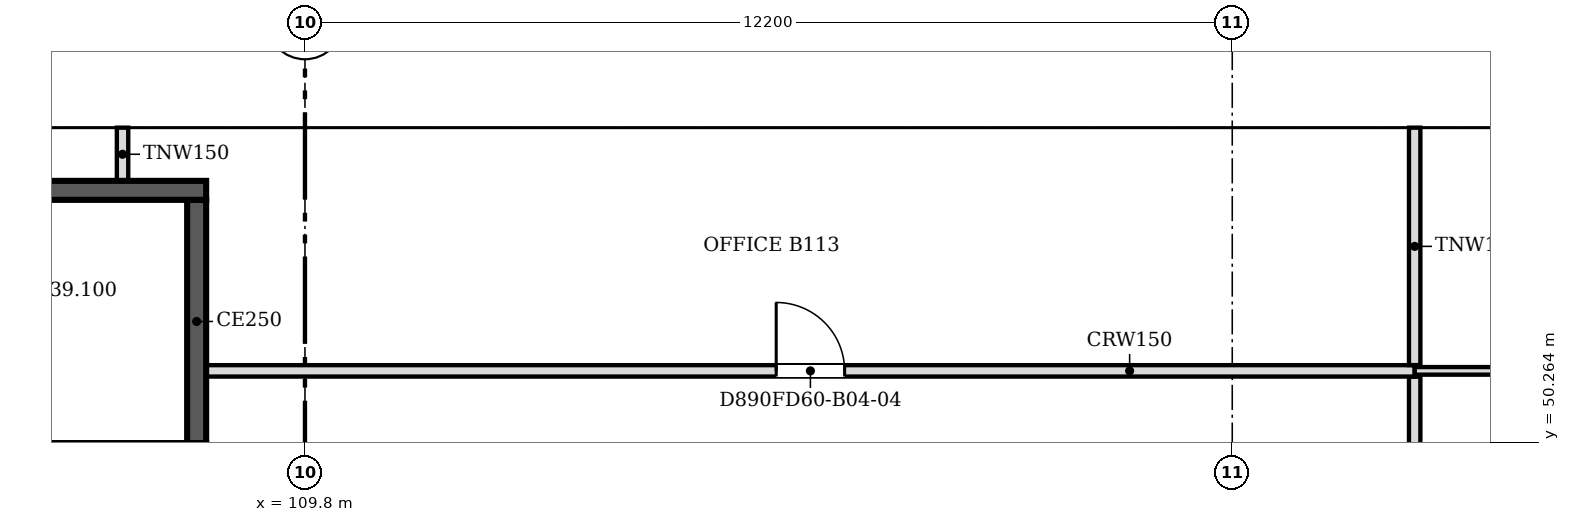
"""IFC4 building model, lengths in metres.
Left out: names, types, materials, properties, quantities, classifications, styles, units other than length and angle.
Written with IfcOpenShell. Run it as: python <this file> out.ifc"""

import sys

from ifc_helpers import new_model, si_unit, direction, frame, frame_2d, origin, place, context, subcontext, project, spatial, polyline, rectangle, outline, extrude, faceted_brep, source, transform, mapped, element, fill, save


model = new_model("IFC4")
c1 = context("Model", 3, precision=1e-05, world=origin(), true_north=direction((0.0, 1.0)))
c2 = subcontext(c1, "Body", "Model", "MODEL_VIEW")
j1 = project(units=[si_unit("LENGTHUNIT", "METRE"), si_unit("PLANEANGLEUNIT", "RADIAN")], contexts=[c1])
p1 = place(None, origin())
s1 = spatial("IfcSite", under=j1, at=p1, CompositionType="ELEMENT")
p2 = place(p1, origin())
s2 = spatial("IfcBuilding", under=s1, at=p2, CompositionType="ELEMENT")
p3 = place(p2, frame((0.0, 0.0, 37.2)))
s3 = spatial("IfcBuildingStorey", under=s2, at=p3, CompositionType="ELEMENT", Elevation=37.2)
m1 = source(origin(), c2, "Body", "Brep", [
    faceted_brep([(3.003, -0.25, 0.0), (6.053, -0.25, 3.8), (3.003, -0.25, 7.6), (0.0, -0.25, 3.8), (0.047, 0.25, 3.859), (3.003, 0.25, 7.6), (6.053, 0.25, 3.8), (3.003, 0.25, 0.0), (0.047, 0.25, 3.741), (0.0, 0.0, 3.8)], [[[0, 1, 2, 3]], [[4, 5, 6, 7, 8]], [[7, 6, 1, 0]], [[6, 5, 2, 1]], [[5, 4, 9, 3, 2]], [[8, 7, 0, 3, 9]], [[8, 9, 4]]]),
])
p4 = place(p3, frame((128.053, 54.65, -3.8), z_axis=(0.0, 0.0, 1.0), x_axis=(-1.0, 0.0, 0.0)))
e1 = element("IfcWall", 1, at=p4, inside=s3, PredefinedType="SOLIDWALL", context=c2, shape_type="MappedRepresentation", body=[
    mapped(m1, transform((0.0, 0.0, 0.0), scale=1.0)),
])
m2 = source(origin(), c2, "Body", "SweptSolid", [
    extrude(outline(polyline([(3.005, 0.401), (5.733, 3.8), (3.005, 7.199), (0.319, 3.8), (3.005, 0.401)])), frame((0.0, 0.26, 0.0), z_axis=(0.0, -1.0, 0.0), x_axis=(1.0, 0.0, 0.0)), (0.0, 0.0, 1.0), 0.52),
])
p5 = place(p4, origin())
e2 = element("IfcOpeningElement", 2, at=p5, cuts=e1, PredefinedType="OPENING", context=c2, shape_type="MappedRepresentation", body=[
    mapped(m2, transform((0.0, 0.0, 0.0), scale=1.0)),
])
m3 = source(origin(), c2, "Body", "SweptSolid", [
    extrude(outline(polyline([(3.05, 0.0), (6.1, 3.8), (3.05, 7.6), (0.0, 3.8), (3.05, 0.0)])), frame((0.0, 0.25, 0.0), z_axis=(0.0, -1.0, 0.0), x_axis=(1.0, 0.0, 0.0)), (0.0, 0.0, 1.0), 0.5),
])
p6 = place(p3, frame((122.0, 54.65, -3.8), z_axis=(0.0, 0.0, 1.0), x_axis=(-1.0, 0.0, 0.0)))
e3 = element("IfcWall", 3, at=p6, inside=s3, PredefinedType="SOLIDWALL", context=c2, shape_type="MappedRepresentation", body=[
    mapped(m3, transform((0.0, 0.0, 0.0), scale=1.0)),
])
m4 = source(origin(), c2, "Body", "SweptSolid", [
    extrude(outline(polyline([(3.05, 0.399), (5.78, 3.8), (3.05, 7.201), (0.321, 3.8), (3.05, 0.399)])), frame((0.0, 0.26, 0.0), z_axis=(0.0, -1.0, 0.0), x_axis=(1.0, 0.0, 0.0)), (0.0, 0.0, 1.0), 0.52),
])
p7 = place(p6, origin())
e4 = element("IfcOpeningElement", 4, at=p7, cuts=e3, PredefinedType="OPENING", context=c2, shape_type="MappedRepresentation", body=[
    mapped(m4, transform((0.0, 0.0, 0.0), scale=1.0)),
])
m5 = source(origin(), c2, "Body", "Brep", [
    faceted_brep([(3.05, -0.25, 0.0), (6.1, -0.25, 3.8), (6.1, -0.25, 3.8), (3.05, -0.25, 7.6), (0.0, -0.25, 3.8), (0.0, 0.25, 3.8), (3.05, 0.25, 7.6), (6.1, 0.25, 3.8), (6.1, 0.25, 3.8), (3.05, 0.25, 0.0)], [[[0, 1, 2, 3, 4]], [[5, 6, 7, 8, 9]], [[9, 8, 1, 0]], [[7, 6, 3, 2]], [[6, 5, 4, 3]], [[5, 9, 0, 4]], [[1, 8, 7, 2]]]),
])
p8 = place(p3, frame((115.9, 54.65, -3.8), z_axis=(0.0, 0.0, 1.0), x_axis=(-1.0, 0.0, 0.0)))
e5 = element("IfcWall", 5, at=p8, inside=s3, PredefinedType="SOLIDWALL", context=c2, shape_type="MappedRepresentation", body=[
    mapped(m5, transform((0.0, 0.0, 0.0), scale=1.0)),
])
p9 = place(p8, origin())
e6 = element("IfcOpeningElement", 6, at=p9, cuts=e5, PredefinedType="OPENING", context=c2, shape_type="MappedRepresentation", body=[
    mapped(m4, transform((0.0, 0.0, 0.0), scale=1.0)),
])
p10 = place(p3, frame((109.8, 54.65, -3.8), z_axis=(0.0, 0.0, 1.0), x_axis=(-1.0, 0.0, 0.0)))
e7 = element("IfcWall", 7, at=p10, inside=s3, PredefinedType="SOLIDWALL", context=c2, shape_type="MappedRepresentation", body=[
    mapped(m3, transform((0.0, 0.0, 0.0), scale=1.0)),
])
p11 = place(p10, origin())
e8 = element("IfcOpeningElement", 8, at=p11, cuts=e7, PredefinedType="OPENING", context=c2, shape_type="MappedRepresentation", body=[
    mapped(m4, transform((0.0, 0.0, 0.0), scale=1.0)),
])
p12 = place(p2, frame((0.0, 0.0, 41.0)))
s4 = spatial("IfcBuildingStorey", under=s2, at=p12, CompositionType="ELEMENT", Elevation=41.0)
m6 = source(origin(), c2, "Body", "Brep", [
    faceted_brep([(0.047, -0.25, 0.0), (3.05, -0.25, 3.8), (0.047, -0.25, 7.6), (0.0, -0.25, 7.54), (0.0, -0.25, 0.06), (0.093, 0.25, 7.541), (3.05, 0.25, 3.8), (0.093, 0.25, 0.059), (0.047, 0.0, 0.0), (0.047, 0.0, 7.6)], [[[0, 1, 2, 3, 4]], [[5, 6, 7]], [[7, 6, 1, 0, 8]], [[6, 5, 9, 2, 1]], [[3, 2, 9]], [[8, 0, 4]], [[7, 8, 4, 3, 9, 5]]]),
])
p13 = place(p12, frame((128.1, 54.65, -3.8), z_axis=(0.0, 0.0, 1.0), x_axis=(-1.0, 0.0, 0.0)))
e9 = element("IfcWall", 9, at=p13, inside=s4, PredefinedType="SOLIDWALL", context=c2, shape_type="MappedRepresentation", body=[
    mapped(m6, transform((0.0, 0.0, 0.0), scale=1.0)),
])
m7 = source(origin(), c2, "Body", "SweptSolid", [
    extrude(outline(polyline([(0.247, 0.656), (2.731, 3.8), (0.247, 6.944), (0.247, 0.656)])), frame((0.0, 0.26, 0.0), z_axis=(0.0, -1.0, 0.0), x_axis=(1.0, 0.0, 0.0)), (0.0, 0.0, 1.0), 0.52),
])
p14 = place(p13, origin())
e10 = element("IfcOpeningElement", 10, at=p14, cuts=e9, PredefinedType="OPENING", context=c2, shape_type="MappedRepresentation", body=[
    mapped(m7, transform((0.0, 0.0, 0.0), scale=1.0)),
])
p15 = place(p12, frame((125.05, 54.65, -3.8), z_axis=(0.0, 0.0, 1.0), x_axis=(-1.0, 0.0, 0.0)))
e11 = element("IfcWall", 11, at=p15, inside=s4, PredefinedType="SOLIDWALL", context=c2, shape_type="MappedRepresentation", body=[
    mapped(m3, transform((0.0, 0.0, 0.0), scale=1.0)),
])
p16 = place(p15, origin())
e12 = element("IfcOpeningElement", 12, at=p16, cuts=e11, PredefinedType="OPENING", context=c2, shape_type="MappedRepresentation", body=[
    mapped(m4, transform((0.0, 0.0, 0.0), scale=1.0)),
])
p17 = place(p12, frame((118.95, 54.65, -3.8), z_axis=(0.0, 0.0, 1.0), x_axis=(-1.0, 0.0, 0.0)))
e13 = element("IfcWall", 13, at=p17, inside=s4, PredefinedType="SOLIDWALL", context=c2, shape_type="MappedRepresentation", body=[
    mapped(m5, transform((0.0, 0.0, 0.0), scale=1.0)),
])
p18 = place(p17, origin())
e14 = element("IfcOpeningElement", 14, at=p18, cuts=e13, PredefinedType="OPENING", context=c2, shape_type="MappedRepresentation", body=[
    mapped(m4, transform((0.0, 0.0, 0.0), scale=1.0)),
])
p19 = place(p12, frame((112.85, 54.65, -3.8), z_axis=(0.0, 0.0, 1.0), x_axis=(-1.0, 0.0, 0.0)))
e15 = element("IfcWall", 15, at=p19, inside=s4, PredefinedType="SOLIDWALL", context=c2, shape_type="MappedRepresentation", body=[
    mapped(m3, transform((0.0, 0.0, 0.0), scale=1.0)),
])
p20 = place(p19, origin())
e16 = element("IfcOpeningElement", 16, at=p20, cuts=e15, PredefinedType="OPENING", context=c2, shape_type="MappedRepresentation", body=[
    mapped(m4, transform((0.0, 0.0, 0.0), scale=1.0)),
])
p21 = place(p12, frame((106.75, 54.65, -3.8), z_axis=(0.0, 0.0, 1.0), x_axis=(-1.0, 0.0, 0.0)))
e17 = element("IfcWall", 17, at=p21, inside=s4, PredefinedType="SOLIDWALL", context=c2, shape_type="MappedRepresentation", body=[
    mapped(m3, transform((0.0, 0.0, 0.0), scale=1.0)),
])
p22 = place(p21, origin())
e18 = element("IfcOpeningElement", 18, at=p22, cuts=e17, PredefinedType="OPENING", context=c2, shape_type="MappedRepresentation", body=[
    mapped(m4, transform((0.0, 0.0, 0.0), scale=1.0)),
])
p23 = place(p3, frame((100.0, 53.575, 0.0), z_axis=(0.0, 0.0, 1.0), x_axis=(1.0, 0.0, 0.0)))
e19 = element("IfcWall", 19, at=p23, inside=s3, PredefinedType="SOLIDWALL", context=c2, shape_type="SweptSolid", body=[
    extrude(rectangle(XDim=8.5, YDim=0.25, at=frame_2d((4.25, 0.0))), origin(), (0.0, 0.0, 1.0), 3.8),
])
p24 = place(p3, frame((108.375, 53.45, 0.0), z_axis=(0.0, 0.0, 1.0), x_axis=(0.0, -1.0, 0.0)))
e20 = element("IfcWall", 20, at=p24, inside=s3, PredefinedType="SOLIDWALL", context=c2, shape_type="SweptSolid", body=[
    extrude(rectangle(XDim=3.2, YDim=0.25, at=frame_2d((1.6, 0.0))), origin(), (0.0, 0.0, 1.0), 3.8),
])
p25 = place(p3, frame((124.4, 51.124, 0.0), z_axis=(0.0, 0.0, 1.0), x_axis=(0.0, -1.0, 0.0)))
e21 = element("IfcWall", 21, at=p25, inside=s3, PredefinedType="PARTITIONING", context=c2, shape_type="SweptSolid", body=[
    extrude(rectangle(XDim=14.524, YDim=0.15, at=frame_2d((7.262, 0.0))), origin(), (0.0, 0.0, 1.0), 3.067),
])
m8 = source(origin(), c2, "Body", "SweptSolid", [
    extrude(rectangle(XDim=1.0, YDim=2.1, at=frame_2d((0.5, 1.05))), frame((0.0, 0.085, 0.0), z_axis=(0.0, -1.0, 0.0), x_axis=(1.0, 0.0, 0.0)), (0.0, 0.0, 1.0), 0.17),
])
p26 = place(p25, frame((3.724, 0.0, 0.0)))
e22 = element("IfcOpeningElement", 22, at=p26, cuts=e21, PredefinedType="OPENING", context=c2, shape_type="MappedRepresentation", body=[
    mapped(m8, transform((0.0, 0.0, 0.0), scale=1.0)),
])
p27 = place(p25, frame((11.024, 0.0, 0.0)))
e23 = element("IfcOpeningElement", 23, at=p27, cuts=e21, PredefinedType="OPENING", context=c2, shape_type="MappedRepresentation", body=[
    mapped(m8, transform((0.0, 0.0, 0.0), scale=1.0)),
])
p28 = place(p3, frame((108.5, 51.2, 0.0), z_axis=(0.0, 0.0, 1.0), x_axis=(1.0, 0.0, 0.0)))
e24 = element("IfcWall", 24, at=p28, inside=s3, PredefinedType="PARTITIONING", context=c2, shape_type="SweptSolid", body=[
    extrude(rectangle(XDim=15.9, YDim=0.15, at=frame_2d((7.95, 0.0))), origin(), (0.0, 0.0, 1.0), 3.067),
])
m9 = source(origin(), c2, "Body", "SweptSolid", [
    extrude(rectangle(XDim=0.9, YDim=2.1, at=frame_2d((0.45, 1.05))), frame((0.0, 0.085, 0.0), z_axis=(0.0, -1.0, 0.0), x_axis=(1.0, 0.0, 0.0)), (0.0, 0.0, 1.0), 0.17),
])
p29 = place(p28, frame((7.5, 0.0, 0.0)))
e25 = element("IfcOpeningElement", 25, at=p29, cuts=e24, PredefinedType="OPENING", context=c2, shape_type="MappedRepresentation", body=[
    mapped(m9, transform((0.0, 0.0, 0.0), scale=1.0)),
])
p30 = place(p3, frame((124.401, 51.2, 0.0), z_axis=(0.0, 0.0, 1.0), x_axis=(1.0, 0.0, 0.0)))
e26 = element("IfcWall", 26, at=p30, inside=s3, PredefinedType="PARTITIONING", context=c2, shape_type="SweptSolid", body=[
    extrude(rectangle(XDim=4.548, YDim=0.1, at=frame_2d((2.274, 0.0))), origin(), (0.0, 0.0, 1.0), 3.067),
])
p31 = place(p3, frame((124.4, 51.276, 0.0), z_axis=(0.0, 0.0, 1.0), x_axis=(0.0, 1.0, 0.0)))
e27 = element("IfcWall", 27, at=p31, inside=s3, PredefinedType="PARTITIONING", context=c2, shape_type="SweptSolid", body=[
    extrude(rectangle(XDim=3.124, YDim=0.15, at=frame_2d((1.562, 0.0))), origin(), (0.0, 0.0, 1.0), 3.067),
])
p32 = place(p3, frame((107.4, 53.7, 0.0), z_axis=(0.0, 0.0, 1.0), x_axis=(0.0, 1.0, 0.0)))
e28 = element("IfcWall", 28, at=p32, inside=s3, PredefinedType="PARTITIONING", context=c2, shape_type="SweptSolid", body=[
    extrude(rectangle(XDim=0.7, YDim=0.15, at=frame_2d((0.35, 0.0))), origin(), (0.0, 0.0, 1.0), 3.067),
])
m10 = source(origin(), c2, "Body", "SweptSolid", [
    extrude(rectangle(XDim=0.9, YDim=2.1, at=frame_2d((0.45, 1.05))), frame((0.0, 0.025, 0.0), z_axis=(0.0, -1.0, 0.0), x_axis=(1.0, 0.0, 0.0)), (0.0, 0.0, 1.0), 0.05),
])
p33 = place(p29, origin())
e29 = element("IfcDoor", 29, at=p33, inside=s3, OperationType="SINGLE_SWING_LEFT", PredefinedType="DOOR", context=c2, shape_type="MappedRepresentation", body=[
    mapped(m10, transform((0.0, 0.0, 0.0), scale=1.0)),
])
fill(e25, e29)
save(model, sys.argv[1])
